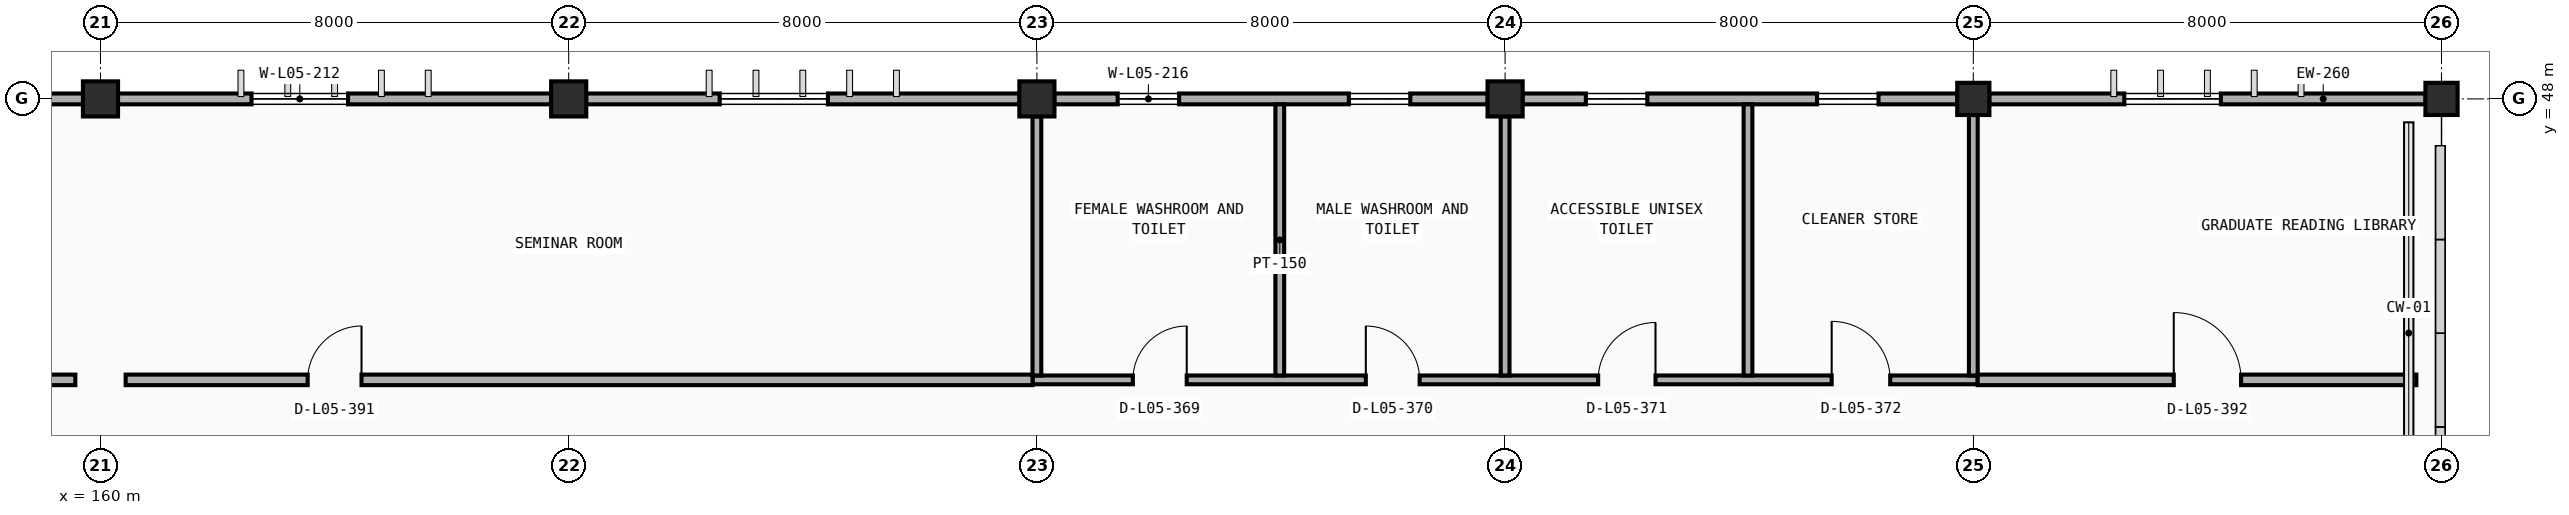
"""IFC4 building model, lengths in metres.
Left out: names, types, materials, properties, quantities, classifications, styles, units other than length and angle.
Written with IfcOpenShell. Run it as: python <this file> out.ifc"""

import sys

from ifc_helpers import new_model, si_unit, direction, frame, frame_2d, origin, origin_2d, place, context, subcontext, project, spatial, rectangle, extrude, element, fill, save


model = new_model("IFC4")
c1 = context("Model", 3, precision=1e-05, world=origin(), true_north=direction((0.0, 1.0)))
c2 = subcontext(c1, "Body", "Model", "MODEL_VIEW")
j1 = project(units=[si_unit("LENGTHUNIT", "METRE"), si_unit("PLANEANGLEUNIT", "RADIAN")], contexts=[c1])
p1 = place(None, origin())
s1 = spatial("IfcSite", under=j1, at=p1, CompositionType="ELEMENT")
p2 = place(p1, origin())
s2 = spatial("IfcBuilding", under=s1, at=p2, CompositionType="ELEMENT")
p3 = place(p2, frame((0.0, 0.0, 18.0)))
s3 = spatial("IfcBuildingStorey", under=s2, at=p3, CompositionType="ELEMENT", Elevation=18.0)
for number, where, z_axis, x_axis in (
    (1, (160.0, 48.0, 0.0), (0.0, 0.0, 1.0), (1.0, 0.0, 0.0)),
    (2, (168.0, 48.0, 0.0), (0.0, 0.0, 1.0), (1.0, 0.0, 0.0)),
    (3, (176.0, 48.0, 0.0), (0.0, 0.0, 1.0), (1.0, 0.0, 0.0)),
    (4, (184.0, 48.0, 0.0), (0.0, 0.0, 1.0), (1.0, 0.0, 0.0)),
):
    element("IfcColumn", number, at=place(p3, frame(where, z_axis=z_axis, x_axis=x_axis)), inside=s3, PredefinedType="COLUMN", context=c2, shape_type="SweptSolid", body=[
        extrude(rectangle(XDim=0.6, YDim=0.6, at=origin_2d()), origin(), (0.0, 0.0, 1.0), 4.2),
    ])
for number, where, z_axis, x_axis in (
    (5, (192.0, 48.0, 0.0), (0.0, 0.0, 1.0), (1.0, 0.0, 0.0)),
    (6, (200.0, 48.0, 0.0), (0.0, 0.0, 1.0), (1.0, 0.0, 0.0)),
):
    element("IfcColumn", number, at=place(p3, frame(where, z_axis=z_axis, x_axis=x_axis)), inside=s3, PredefinedType="COLUMN", context=c2, shape_type="SweptSolid", body=[
        extrude(rectangle(XDim=0.55, YDim=0.55, at=origin_2d()), origin(), (0.0, 0.0, 1.0), 4.2),
    ])
p4 = place(p3, frame((152.297, 48.0, 0.0), z_axis=(0.0, 0.0, 1.0), x_axis=(1.0, 0.0, 0.0)))
e7 = element("IfcWall", 7, at=p4, inside=s3, PredefinedType="STANDARD", context=c2, shape_type="SweptSolid", body=[
    extrude(rectangle(XDim=7.406, YDim=0.185, at=frame_2d((3.703, 0.0))), origin(), (0.0, 0.0, 1.0), 3.335),
])
p5 = place(p4, frame((2.283, 0.0, 0.9)))
e8 = element("IfcOpeningElement", 8, at=p5, cuts=e7, PredefinedType="OPENING", context=c2, shape_type="SweptSolid", body=[
    extrude(rectangle(XDim=2.25, YDim=1.85, at=frame_2d((1.125, 0.925))), frame((0.0, 0.103, 0.0), z_axis=(0.0, -1.0, 0.0), x_axis=(1.0, 0.0, 0.0)), (0.0, 0.0, 1.0), 0.205),
])
p6 = place(p3, frame((160.297, 48.0, 0.0), z_axis=(0.0, 0.0, 1.0), x_axis=(1.0, 0.0, 0.0)))
e9 = element("IfcWall", 9, at=p6, inside=s3, PredefinedType="STANDARD", context=c2, shape_type="SweptSolid", body=[
    extrude(rectangle(XDim=7.406, YDim=0.185, at=frame_2d((3.703, 0.0))), origin(), (0.0, 0.0, 1.0), 3.335),
])
p7 = place(p6, frame((2.283, 0.0, 0.9)))
e10 = element("IfcOpeningElement", 10, at=p7, cuts=e9, PredefinedType="OPENING", context=c2, shape_type="SweptSolid", body=[
    extrude(rectangle(XDim=1.65, YDim=1.85, at=frame_2d((0.825, 0.925))), frame((0.0, 0.103, 0.0), z_axis=(0.0, -1.0, 0.0), x_axis=(1.0, 0.0, 0.0)), (0.0, 0.0, 1.0), 0.205),
])
p8 = place(p3, frame((168.297, 48.0, 0.0), z_axis=(0.0, 0.0, 1.0), x_axis=(1.0, 0.0, 0.0)))
e11 = element("IfcWall", 11, at=p8, inside=s3, PredefinedType="STANDARD", context=c2, shape_type="SweptSolid", body=[
    extrude(rectangle(XDim=7.406, YDim=0.185, at=frame_2d((3.703, 0.0))), origin(), (0.0, 0.0, 1.0), 3.335),
])
p9 = place(p8, frame((2.283, 0.0, 0.9)))
e12 = element("IfcOpeningElement", 12, at=p9, cuts=e11, PredefinedType="OPENING", context=c2, shape_type="SweptSolid", body=[
    extrude(rectangle(XDim=1.85, YDim=1.85, at=frame_2d((0.925, 0.925))), frame((0.0, 0.103, 0.0), z_axis=(0.0, -1.0, 0.0), x_axis=(1.0, 0.0, 0.0)), (0.0, 0.0, 1.0), 0.205),
])
p10 = place(p3, frame((176.297, 48.0, 0.0), z_axis=(0.0, 0.0, 1.0), x_axis=(1.0, 0.0, 0.0)))
e13 = element("IfcWall", 13, at=p10, inside=s3, PredefinedType="STANDARD", context=c2, shape_type="SweptSolid", body=[
    extrude(rectangle(XDim=7.406, YDim=0.185, at=frame_2d((3.703, 0.0))), origin(), (0.0, 0.0, 1.0), 3.335),
])
p11 = place(p10, frame((1.083, 0.0, 1.15)))
e14 = element("IfcOpeningElement", 14, at=p11, cuts=e13, PredefinedType="OPENING", context=c2, shape_type="SweptSolid", body=[
    extrude(rectangle(XDim=1.05, YDim=1.25, at=frame_2d((0.525, 0.625))), frame((0.0, 0.103, 0.0), z_axis=(0.0, -1.0, 0.0), x_axis=(1.0, 0.0, 0.0)), (0.0, 0.0, 1.0), 0.205),
])
p12 = place(p10, frame((5.033, 0.0, 1.15)))
e15 = element("IfcOpeningElement", 15, at=p12, cuts=e13, PredefinedType="OPENING", context=c2, shape_type="SweptSolid", body=[
    extrude(rectangle(XDim=1.05, YDim=1.25, at=frame_2d((0.525, 0.625))), frame((0.0, 0.103, 0.0), z_axis=(0.0, -1.0, 0.0), x_axis=(1.0, 0.0, 0.0)), (0.0, 0.0, 1.0), 0.205),
])
p13 = place(p3, frame((184.297, 48.0, 0.0), z_axis=(0.0, 0.0, 1.0), x_axis=(1.0, 0.0, 0.0)))
e16 = element("IfcWall", 16, at=p13, inside=s3, PredefinedType="STANDARD", context=c2, shape_type="SweptSolid", body=[
    extrude(rectangle(XDim=7.431, YDim=0.185, at=frame_2d((3.715, 0.0))), origin(), (0.0, 0.0, 1.0), 3.335),
])
p14 = place(p13, frame((1.083, 0.0, 1.15)))
e17 = element("IfcOpeningElement", 17, at=p14, cuts=e16, PredefinedType="OPENING", context=c2, shape_type="SweptSolid", body=[
    extrude(rectangle(XDim=1.05, YDim=1.25, at=frame_2d((0.525, 0.625))), frame((0.0, 0.103, 0.0), z_axis=(0.0, -1.0, 0.0), x_axis=(1.0, 0.0, 0.0)), (0.0, 0.0, 1.0), 0.205),
])
p15 = place(p13, frame((5.033, 0.0, 1.15)))
e18 = element("IfcOpeningElement", 18, at=p15, cuts=e16, PredefinedType="OPENING", context=c2, shape_type="SweptSolid", body=[
    extrude(rectangle(XDim=1.05, YDim=1.25, at=frame_2d((0.525, 0.625))), frame((0.0, 0.103, 0.0), z_axis=(0.0, -1.0, 0.0), x_axis=(1.0, 0.0, 0.0)), (0.0, 0.0, 1.0), 0.205),
])
p16 = place(p3, frame((192.272, 48.0, 0.0), z_axis=(0.0, 0.0, 1.0), x_axis=(1.0, 0.0, 0.0)))
e19 = element("IfcWall", 19, at=p16, inside=s3, PredefinedType="STANDARD", context=c2, shape_type="SweptSolid", body=[
    extrude(rectangle(XDim=7.456, YDim=0.185, at=frame_2d((3.728, 0.0))), origin(), (0.0, 0.0, 1.0), 3.335),
])
p17 = place(p16, frame((2.308, 0.0, 0.9)))
e20 = element("IfcOpeningElement", 20, at=p17, cuts=e19, PredefinedType="OPENING", context=c2, shape_type="SweptSolid", body=[
    extrude(rectangle(XDim=1.65, YDim=1.85, at=frame_2d((0.825, 0.925))), frame((0.0, 0.103, 0.0), z_axis=(0.0, -1.0, 0.0), x_axis=(1.0, 0.0, 0.0)), (0.0, 0.0, 1.0), 0.205),
])
p18 = place(p3, frame((199.76, 47.78, 0.0), z_axis=(0.0, 0.0, 1.0), x_axis=(-1.0, 0.0, 0.0)))
e21 = element("IfcWall", 21, at=p18, inside=s3, PredefinedType="PARAPET", context=c2, shape_type="SweptSolid", body=[
    extrude(rectangle(XDim=0.32, YDim=0.2, at=frame_2d((0.16, 0.0))), origin(), (0.0, 0.0, 1.0), 3.35),
])
p19 = place(p3, frame((175.925, 43.2, 0.0), z_axis=(0.0, 0.0, 1.0), x_axis=(1.0, 0.0, 0.0)))
e22 = element("IfcWall", 22, at=p19, inside=s3, PredefinedType="PARTITIONING", context=c2, shape_type="SweptSolid", body=[
    extrude(rectangle(XDim=16.15, YDim=0.15, at=frame_2d((8.075, 0.0))), origin(), (0.0, 0.0, 1.0), 3.3),
])
p20 = place(p19, frame((1.715, 0.0, 0.0)))
e23 = element("IfcOpeningElement", 23, at=p20, cuts=e22, PredefinedType="OPENING", context=c2, shape_type="SweptSolid", body=[
    extrude(rectangle(XDim=0.92, YDim=2.12, at=frame_2d((0.46, 1.06))), frame((0.0, 0.085, 0.0), z_axis=(0.0, -1.0, 0.0), x_axis=(1.0, 0.0, 0.0)), (0.0, 0.0, 1.0), 0.17),
])
p21 = place(p19, frame((5.695, 0.0, 0.0)))
e24 = element("IfcOpeningElement", 24, at=p21, cuts=e22, PredefinedType="OPENING", context=c2, shape_type="SweptSolid", body=[
    extrude(rectangle(XDim=0.92, YDim=2.12, at=frame_2d((0.46, 1.06))), frame((0.0, 0.085, 0.0), z_axis=(0.0, -1.0, 0.0), x_axis=(1.0, 0.0, 0.0)), (0.0, 0.0, 1.0), 0.17),
])
p22 = place(p19, frame((9.665, 0.0, 0.0)))
e25 = element("IfcOpeningElement", 25, at=p22, cuts=e22, PredefinedType="OPENING", context=c2, shape_type="SweptSolid", body=[
    extrude(rectangle(XDim=0.98, YDim=2.12, at=frame_2d((0.49, 1.06))), frame((0.0, 0.085, 0.0), z_axis=(0.0, -1.0, 0.0), x_axis=(1.0, 0.0, 0.0)), (0.0, 0.0, 1.0), 0.17),
])
p23 = place(p19, frame((13.655, 0.0, 0.0)))
e26 = element("IfcOpeningElement", 26, at=p23, cuts=e22, PredefinedType="OPENING", context=c2, shape_type="SweptSolid", body=[
    extrude(rectangle(XDim=1.0, YDim=2.15, at=frame_2d((0.5, 1.075))), frame((0.0, 0.085, 0.0), z_axis=(0.0, -1.0, 0.0), x_axis=(1.0, 0.0, 0.0)), (0.0, 0.0, 1.0), 0.17),
])
p24 = place(p3, frame((176.0, 43.275, 0.0), z_axis=(0.0, 0.0, 1.0), x_axis=(0.0, 1.0, 0.0)))
e27 = element("IfcWall", 27, at=p24, inside=s3, PredefinedType="PARTITIONING", context=c2, shape_type="SweptSolid", body=[
    extrude(rectangle(XDim=4.425, YDim=0.15, at=frame_2d((2.212, 0.0))), origin(), (0.0, 0.0, 1.0), 3.3),
])
p25 = place(p3, frame((180.15, 43.275, 0.0), z_axis=(0.0, 0.0, 1.0), x_axis=(0.0, 1.0, 0.0)))
e28 = element("IfcWall", 28, at=p25, inside=s3, PredefinedType="PARTITIONING", context=c2, shape_type="SweptSolid", body=[
    extrude(rectangle(XDim=4.633, YDim=0.15, at=frame_2d((2.316, 0.0))), origin(), (0.0, 0.0, 1.0), 3.3),
])
p26 = place(p3, frame((184.0, 43.275, 0.0), z_axis=(0.0, 0.0, 1.0), x_axis=(0.0, 1.0, 0.0)))
e29 = element("IfcWall", 29, at=p26, inside=s3, PredefinedType="PARTITIONING", context=c2, shape_type="SweptSolid", body=[
    extrude(rectangle(XDim=4.425, YDim=0.15, at=frame_2d((2.212, 0.0))), origin(), (0.0, 0.0, 1.0), 3.3),
])
p27 = place(p3, frame((188.15, 43.275, 0.0), z_axis=(0.0, 0.0, 1.0), x_axis=(0.0, 1.0, 0.0)))
e30 = element("IfcWall", 30, at=p27, inside=s3, PredefinedType="PARTITIONING", context=c2, shape_type="SweptSolid", body=[
    extrude(rectangle(XDim=4.633, YDim=0.15, at=frame_2d((2.316, 0.0))), origin(), (0.0, 0.0, 1.0), 3.3),
])
p28 = place(p3, frame((192.0, 43.275, 0.0), z_axis=(0.0, 0.0, 1.0), x_axis=(0.0, 1.0, 0.0)))
e31 = element("IfcWall", 31, at=p28, inside=s3, PredefinedType="PARTITIONING", context=c2, shape_type="SweptSolid", body=[
    extrude(rectangle(XDim=4.45, YDim=0.15, at=frame_2d((2.225, 0.0))), origin(), (0.0, 0.0, 1.0), 3.3),
])
p29 = place(p3, frame((128.43, 43.2, 0.0), z_axis=(0.0, 0.0, 1.0), x_axis=(1.0, 0.0, 0.0)))
e32 = element("IfcWall", 32, at=p29, inside=s3, PredefinedType="PARTITIONING", context=c2, shape_type="SweptSolid", body=[
    extrude(rectangle(XDim=31.14, YDim=0.18, at=frame_2d((15.57, 0.0))), origin(), (0.0, 0.0, 1.0), 3.3),
])
p30 = place(p29, frame((3.04, 0.0, 0.0)))
e33 = element("IfcOpeningElement", 33, at=p30, cuts=e32, PredefinedType="OPENING", context=c2, shape_type="SweptSolid", body=[
    extrude(rectangle(XDim=1.06, YDim=2.1, at=frame_2d((0.53, 1.05))), frame((0.0, 0.1, 0.0), z_axis=(0.0, -1.0, 0.0), x_axis=(1.0, 0.0, 0.0)), (0.0, 0.0, 1.0), 0.2),
])
p31 = place(p3, frame((160.43, 43.2, 0.0), z_axis=(0.0, 0.0, 1.0), x_axis=(1.0, 0.0, 0.0)))
e34 = element("IfcWall", 34, at=p31, inside=s3, PredefinedType="PARTITIONING", context=c2, shape_type="SweptSolid", body=[
    extrude(rectangle(XDim=15.495, YDim=0.18, at=frame_2d((7.748, 0.0))), origin(), (0.0, 0.0, 1.0), 3.3),
])
p32 = place(p31, frame((3.11, 0.0, 0.0)))
e35 = element("IfcOpeningElement", 35, at=p32, cuts=e34, PredefinedType="OPENING", context=c2, shape_type="SweptSolid", body=[
    extrude(rectangle(XDim=0.92, YDim=2.15, at=frame_2d((0.46, 1.075))), frame((0.0, 0.1, 0.0), z_axis=(0.0, -1.0, 0.0), x_axis=(1.0, 0.0, 0.0)), (0.0, 0.0, 1.0), 0.2),
])
p33 = place(p3, frame((192.075, 43.2, 0.0), z_axis=(0.0, 0.0, 1.0), x_axis=(1.0, 0.0, 0.0)))
e36 = element("IfcWall", 36, at=p33, inside=s3, PredefinedType="PARTITIONING", context=c2, shape_type="SweptSolid", body=[
    extrude(rectangle(XDim=7.495, YDim=0.18, at=frame_2d((3.748, 0.0))), origin(), (0.0, 0.0, 1.0), 3.3),
])
p34 = place(p33, frame((3.35, 0.0, 0.0)))
e37 = element("IfcOpeningElement", 37, at=p34, cuts=e36, PredefinedType="OPENING", context=c2, shape_type="SweptSolid", body=[
    extrude(rectangle(XDim=1.15, YDim=2.15, at=frame_2d((0.575, 1.075))), frame((0.0, 0.1, 0.0), z_axis=(0.0, -1.0, 0.0), x_axis=(1.0, 0.0, 0.0)), (0.0, 0.0, 1.0), 0.2),
])
p35 = place(p7, origin())
e38 = element("IfcWindow", 38, at=p35, inside=s3, PartitioningType="DOUBLE_PANEL_VERTICAL", PredefinedType="WINDOW", context=c2, shape_type="SweptSolid", body=[
    extrude(rectangle(XDim=1.65, YDim=1.85, at=frame_2d((0.825, 0.925))), frame((0.0, 0.03, 0.0), z_axis=(0.0, -1.0, 0.0), x_axis=(1.0, 0.0, 0.0)), (0.0, 0.0, 1.0), 0.06),
])
fill(e10, e38)
p36 = place(p9, origin())
e39 = element("IfcWindow", 39, at=p36, inside=s3, PartitioningType="DOUBLE_PANEL_VERTICAL", PredefinedType="WINDOW", context=c2, shape_type="SweptSolid", body=[
    extrude(rectangle(XDim=1.85, YDim=1.85, at=frame_2d((0.925, 0.925))), frame((0.0, 0.03, 0.0), z_axis=(0.0, -1.0, 0.0), x_axis=(1.0, 0.0, 0.0)), (0.0, 0.0, 1.0), 0.06),
])
fill(e12, e39)
p37 = place(p11, origin())
e40 = element("IfcWindow", 40, at=p37, inside=s3, PartitioningType="SINGLE_PANEL", PredefinedType="WINDOW", context=c2, shape_type="SweptSolid", body=[
    extrude(rectangle(XDim=1.05, YDim=1.25, at=frame_2d((0.525, 0.625))), frame((0.0, 0.03, 0.0), z_axis=(0.0, -1.0, 0.0), x_axis=(1.0, 0.0, 0.0)), (0.0, 0.0, 1.0), 0.06),
])
fill(e14, e40)
p38 = place(p12, origin())
e41 = element("IfcWindow", 41, at=p38, inside=s3, PartitioningType="SINGLE_PANEL", PredefinedType="WINDOW", context=c2, shape_type="SweptSolid", body=[
    extrude(rectangle(XDim=1.05, YDim=1.25, at=frame_2d((0.525, 0.625))), frame((0.0, 0.03, 0.0), z_axis=(0.0, -1.0, 0.0), x_axis=(1.0, 0.0, 0.0)), (0.0, 0.0, 1.0), 0.06),
])
fill(e15, e41)
p39 = place(p14, origin())
e42 = element("IfcWindow", 42, at=p39, inside=s3, PartitioningType="SINGLE_PANEL", PredefinedType="WINDOW", context=c2, shape_type="SweptSolid", body=[
    extrude(rectangle(XDim=1.05, YDim=1.25, at=frame_2d((0.525, 0.625))), frame((0.0, 0.03, 0.0), z_axis=(0.0, -1.0, 0.0), x_axis=(1.0, 0.0, 0.0)), (0.0, 0.0, 1.0), 0.06),
])
fill(e17, e42)
p40 = place(p15, origin())
e43 = element("IfcWindow", 43, at=p40, inside=s3, PartitioningType="SINGLE_PANEL", PredefinedType="WINDOW", context=c2, shape_type="SweptSolid", body=[
    extrude(rectangle(XDim=1.05, YDim=1.25, at=frame_2d((0.525, 0.625))), frame((0.0, 0.03, 0.0), z_axis=(0.0, -1.0, 0.0), x_axis=(1.0, 0.0, 0.0)), (0.0, 0.0, 1.0), 0.06),
])
fill(e18, e43)
p41 = place(p17, origin())
e44 = element("IfcWindow", 44, at=p41, inside=s3, PartitioningType="DOUBLE_PANEL_VERTICAL", PredefinedType="WINDOW", context=c2, shape_type="SweptSolid", body=[
    extrude(rectangle(XDim=1.65, YDim=1.85, at=frame_2d((0.825, 0.925))), frame((0.0, 0.03, 0.0), z_axis=(0.0, -1.0, 0.0), x_axis=(1.0, 0.0, 0.0)), (0.0, 0.0, 1.0), 0.06),
])
fill(e20, e44)
p42 = place(p20, origin())
e45 = element("IfcDoor", 45, at=p42, inside=s3, OperationType="SINGLE_SWING_RIGHT", PredefinedType="DOOR", context=c2, shape_type="SweptSolid", body=[
    extrude(rectangle(XDim=0.92, YDim=2.12, at=frame_2d((0.46, 1.06))), frame((0.0, 0.025, 0.0), z_axis=(0.0, -1.0, 0.0), x_axis=(1.0, 0.0, 0.0)), (0.0, 0.0, 1.0), 0.05),
])
fill(e23, e45)
p43 = place(p21, origin())
e46 = element("IfcDoor", 46, at=p43, inside=s3, OperationType="SINGLE_SWING_LEFT", PredefinedType="DOOR", context=c2, shape_type="SweptSolid", body=[
    extrude(rectangle(XDim=0.92, YDim=2.12, at=frame_2d((0.46, 1.06))), frame((0.0, 0.025, 0.0), z_axis=(0.0, -1.0, 0.0), x_axis=(1.0, 0.0, 0.0)), (0.0, 0.0, 1.0), 0.05),
])
fill(e24, e46)
p44 = place(p22, origin())
e47 = element("IfcDoor", 47, at=p44, inside=s3, OperationType="SINGLE_SWING_RIGHT", PredefinedType="DOOR", context=c2, shape_type="SweptSolid", body=[
    extrude(rectangle(XDim=0.98, YDim=2.12, at=frame_2d((0.49, 1.06))), frame((0.0, 0.025, 0.0), z_axis=(0.0, -1.0, 0.0), x_axis=(1.0, 0.0, 0.0)), (0.0, 0.0, 1.0), 0.05),
])
fill(e25, e47)
p45 = place(p23, origin())
e48 = element("IfcDoor", 48, at=p45, inside=s3, OperationType="SINGLE_SWING_LEFT", PredefinedType="DOOR", context=c2, shape_type="SweptSolid", body=[
    extrude(rectangle(XDim=1.0, YDim=2.15, at=frame_2d((0.5, 1.075))), frame((0.0, 0.025, 0.0), z_axis=(0.0, -1.0, 0.0), x_axis=(1.0, 0.0, 0.0)), (0.0, 0.0, 1.0), 0.05),
])
fill(e26, e48)
p46 = place(p32, origin())
e49 = element("IfcDoor", 49, at=p46, inside=s3, OperationType="SINGLE_SWING_RIGHT", PredefinedType="DOOR", context=c2, shape_type="SweptSolid", body=[
    extrude(rectangle(XDim=0.92, YDim=2.15, at=frame_2d((0.46, 1.075))), frame((0.0, 0.025, 0.0), z_axis=(0.0, -1.0, 0.0), x_axis=(1.0, 0.0, 0.0)), (0.0, 0.0, 1.0), 0.05),
])
fill(e35, e49)
p47 = place(p34, origin())
e50 = element("IfcDoor", 50, at=p47, inside=s3, OperationType="SINGLE_SWING_LEFT", PredefinedType="DOOR", context=c2, shape_type="SweptSolid", body=[
    extrude(rectangle(XDim=1.15, YDim=2.15, at=frame_2d((0.575, 1.075))), frame((0.0, 0.025, 0.0), z_axis=(0.0, -1.0, 0.0), x_axis=(1.0, 0.0, 0.0)), (0.0, 0.0, 1.0), 0.05),
])
fill(e37, e50)
save(model, sys.argv[1])
